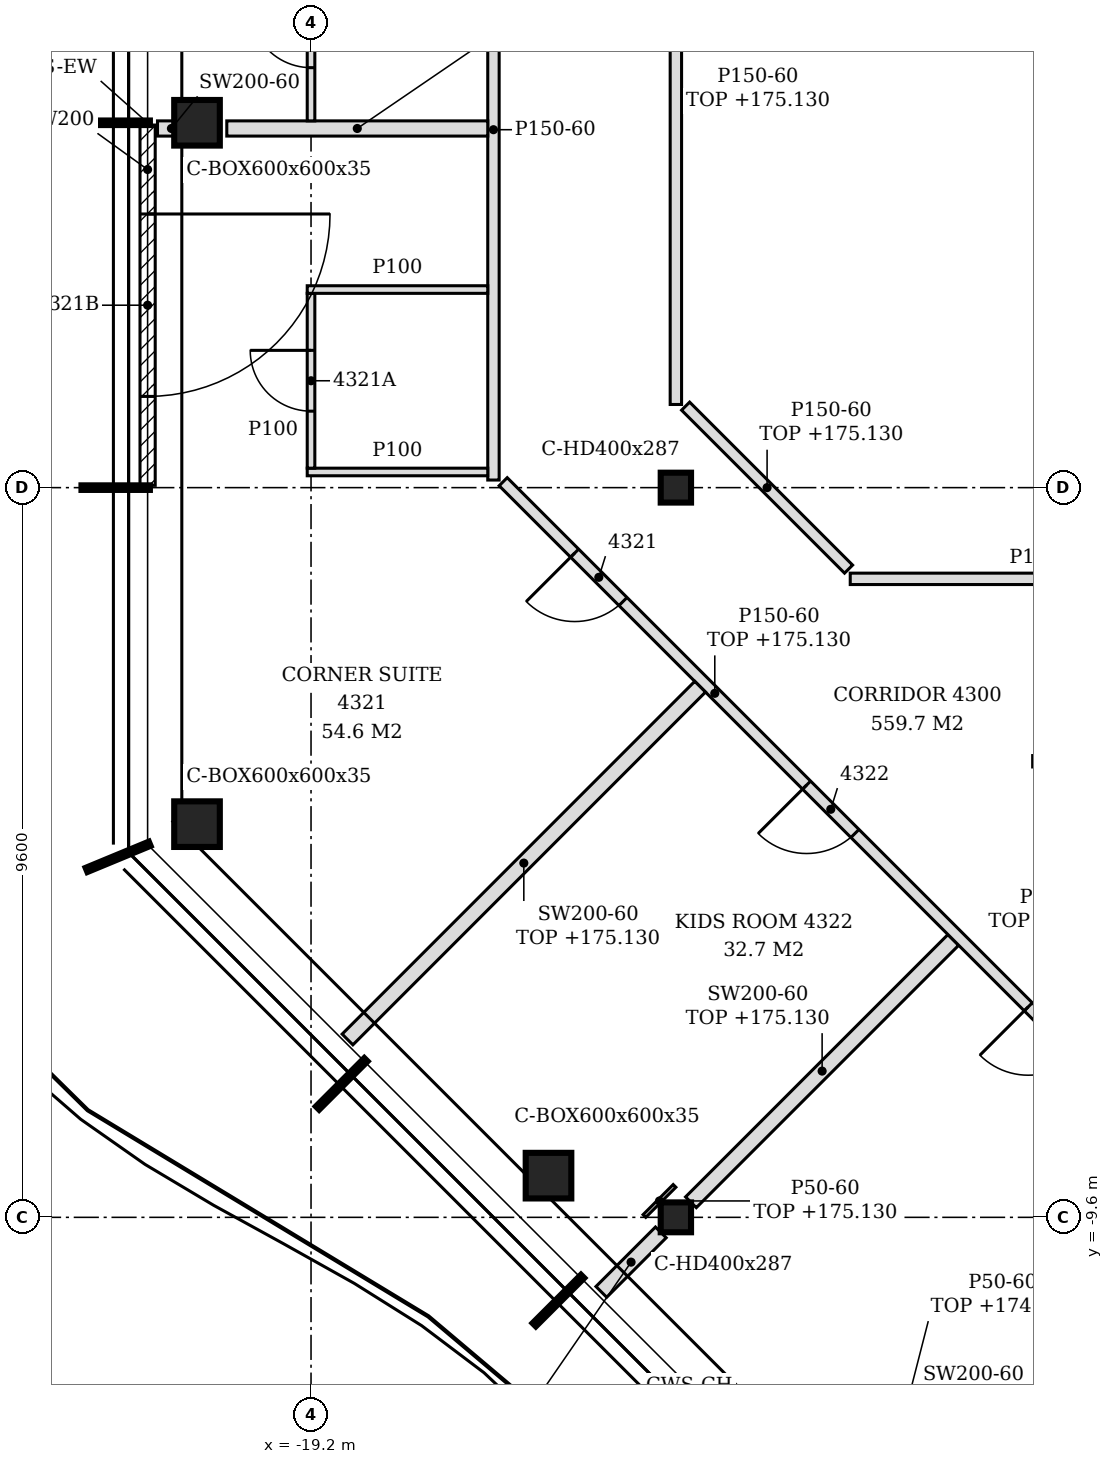
"""IFC4 building model, lengths in metres.
Left out: names, types, materials, properties, quantities, classifications, styles, units other than length and angle.
Written with IfcOpenShell. Run it as: python <this file> out.ifc"""

import sys

from ifc_helpers import new_model, si_unit, direction, frame, frame_2d, origin, origin_2d, place, context, subcontext, project, spatial, polyline, rectangle, hollow_rectangle, i_section, outline, extrude, clip, halfspace, element, fill, save


model = new_model("IFC4")
c1 = context("Model", 3, precision=1e-05, world=origin(), true_north=direction((0.0, 1.0)))
c2 = subcontext(c1, "Body", "Model", "MODEL_VIEW")
j1 = project(units=[si_unit("LENGTHUNIT", "METRE"), si_unit("PLANEANGLEUNIT", "RADIAN")], contexts=[c1])
p1 = place(None, origin())
s1 = spatial("IfcSite", under=j1, at=p1, CompositionType="ELEMENT")
p2 = place(p1, origin())
s2 = spatial("IfcBuilding", under=s1, at=p2, CompositionType="ELEMENT")
p3 = place(p2, frame((0.0, 0.0, 172.2)))
s3 = spatial("IfcBuildingStorey", under=s2, at=p3, CompositionType="ELEMENT", Elevation=172.2)
p4 = place(p3, frame((-20.7, 4.8, -0.15), z_axis=(0.062286415717, -0.041591906261, 0.997191313515), x_axis=(0.555325171193, 0.831633305153, 0.0)))
e1 = element("IfcColumn", 1, at=p4, inside=s3, PredefinedType="COLUMN", context=c2, shape_type="Clipping", body=[
    clip(clip(extrude(hollow_rectangle(XDim=0.6, YDim=0.6, WallThickness=0.035, at=origin_2d()), origin(), (0.0, 0.0, 1.0), 3.61), halfspace(frame((0.0, 0.0, 0.011), z_axis=(0.0, 0.0, 1.0), x_axis=(1.0, 0.0, 0.0)), True)), halfspace(frame((0.0, 0.0, 3.588), z_axis=(0.0, 0.0, 1.0), x_axis=(1.0, 0.0, 0.0)), False)),
])
p5 = place(p3, frame((-20.7, -4.427, -0.15), z_axis=(0.062286590776, -0.041524393851, 0.99719411617), x_axis=(0.554700196225, 0.832050294338, 0.0)))
e2 = element("IfcColumn", 2, at=p5, inside=s3, PredefinedType="COLUMN", context=c2, shape_type="Clipping", body=[
    clip(clip(extrude(hollow_rectangle(XDim=0.6, YDim=0.6, WallThickness=0.035, at=origin_2d()), origin(), (0.0, 0.0, 1.0), 3.61), halfspace(frame((0.0, 0.0, 0.011), z_axis=(0.0, 0.0, 1.0), x_axis=(1.0, 0.0, 0.0)), True)), halfspace(frame((0.0, 0.0, 3.588), z_axis=(0.0, 0.0, 1.0), x_axis=(1.0, 0.0, 0.0)), False)),
])
p6 = place(p3, frame((-16.076, -9.052, -0.15), z_axis=(0.06235395728, -0.04152421884, 0.997189913337), x_axis=(0.554283476609, 0.832327956732, 0.0)))
e3 = element("IfcColumn", 3, at=p6, inside=s3, PredefinedType="COLUMN", context=c2, shape_type="Clipping", body=[
    clip(clip(extrude(hollow_rectangle(XDim=0.6, YDim=0.6, WallThickness=0.035, at=origin_2d()), origin(), (0.0, 0.0, 1.0), 3.61), halfspace(frame((0.0, 0.0, 0.011), z_axis=(0.0, 0.0, 1.0), x_axis=(1.0, 0.0, 0.0)), True)), halfspace(frame((0.0, 0.0, 3.588), z_axis=(0.0, 0.0, 1.0), x_axis=(1.0, 0.0, 0.0)), False)),
])
for number, where, z_axis, x_axis in (
    (4, (-14.4, -9.6, -0.15), (0.0, 0.0, 1.0), (1.0, 0.0, 0.0)),
    (5, (-14.4, 0.0, -0.15), (0.0, 0.0, 1.0), (1.0, 0.0, 0.0)),
):
    element("IfcColumn", number, at=place(p3, frame(where, z_axis=z_axis, x_axis=x_axis)), inside=s3, PredefinedType="COLUMN", context=c2, shape_type="SweptSolid", body=[
        extrude(i_section(OverallWidth=0.399, OverallDepth=0.393, WebThickness=0.023, FlangeThickness=0.037, FilletRadius=0.015, at=origin_2d()), origin(), (0.0, 0.0, 1.0), 3.6),
    ])
p7 = place(p3, frame((-21.35, 4.77, 0.0), z_axis=(0.0, 0.0, 1.0), x_axis=(0.0, -1.0, 0.0)))
e6 = element("IfcWall", 6, at=p7, inside=s3, PredefinedType="NOTDEFINED", context=c2, shape_type="SweptSolid", body=[
    extrude(rectangle(XDim=4.74, YDim=0.2, at=frame_2d((2.37, 0.0))), origin(), (0.0, 0.0, 1.0), 3.45),
])
p8 = place(p7, frame((1.17, 0.0, 0.0)))
e7 = element("IfcOpeningElement", 7, at=p8, cuts=e6, PredefinedType="OPENING", context=c2, shape_type="SweptSolid", body=[
    extrude(rectangle(XDim=2.4, YDim=2.4, at=frame_2d((1.2, 1.2))), frame((0.0, 0.11, 0.0), z_axis=(0.0, -1.0, 0.0), x_axis=(1.0, 0.0, 0.0)), (0.0, 0.0, 1.0), 0.22),
])
p9 = place(p3, frame((-11.071, -13.482, 0.0), z_axis=(0.0, 0.0, 1.0), x_axis=(0.707034704659, 0.707178850368, 0.0)))
e8 = element("IfcWall", 8, at=p9, inside=s3, PredefinedType="PARTITIONING", context=c2, shape_type="SweptSolid", body=[
    extrude(rectangle(XDim=3.387, YDim=0.2, at=frame_2d((1.694, 0.0))), origin(), (0.0, 0.0, 1.0), 3.45),
])
p10 = place(p3, frame((-15.381, -10.581, 0.0), z_axis=(0.0, 0.0, 1.0), x_axis=(0.707217034054, 0.706996511125, 0.0)))
e9 = element("IfcWall", 9, at=p10, inside=s3, PredefinedType="PARTITIONING", context=c2, shape_type="SweptSolid", body=[
    extrude(rectangle(XDim=1.107, YDim=0.2, at=frame_2d((0.554, 0.0))), origin(), (0.0, 0.0, 1.0), 2.63),
])
p11 = place(p3, frame((-14.202, -9.402, 0.0), z_axis=(0.0, 0.0, 1.0), x_axis=(0.707081776084, 0.707131785404, 0.0)))
e10 = element("IfcWall", 10, at=p11, inside=s3, PredefinedType="PARTITIONING", context=c2, shape_type="SweptSolid", body=[
    extrude(rectangle(XDim=4.882, YDim=0.2, at=frame_2d((2.441, 0.0))), origin(), (0.0, 0.0, 1.0), 2.93),
])
p12 = place(p3, frame((-8.322, -8.272, 0.0), z_axis=(0.0, 0.0, 1.0), x_axis=(-0.707117118476, 0.707096443746, 0.0)))
e11 = element("IfcWall", 11, at=p12, inside=s3, PredefinedType="PARTITIONING", context=c2, shape_type="SweptSolid", body=[
    extrude(rectangle(XDim=11.809, YDim=0.15, at=frame_2d((5.904, 0.0))), origin(), (0.0, 0.0, 1.0), 2.93),
])
p13 = place(p12, frame((9.579, 0.0, 0.0)))
e12 = element("IfcOpeningElement", 12, at=p13, cuts=e11, PredefinedType="OPENING", context=c2, shape_type="SweptSolid", body=[
    extrude(rectangle(XDim=0.9, YDim=2.1, at=frame_2d((0.45, 1.05))), frame((0.0, 0.085, 0.0), z_axis=(0.0, -1.0, 0.0), x_axis=(1.0, 0.0, 0.0)), (0.0, 0.0, 1.0), 0.17),
])
p14 = place(p12, frame((5.264, 0.0, 0.0)))
e13 = element("IfcOpeningElement", 13, at=p14, cuts=e11, PredefinedType="OPENING", context=c2, shape_type="SweptSolid", body=[
    extrude(rectangle(XDim=0.9, YDim=2.1, at=frame_2d((0.45, 1.05))), frame((0.0, 0.085, 0.0), z_axis=(0.0, -1.0, 0.0), x_axis=(1.0, 0.0, 0.0)), (0.0, 0.0, 1.0), 0.17),
])
p15 = place(p12, frame((1.139, 0.0, 0.0)))
e14 = element("IfcOpeningElement", 14, at=p15, cuts=e11, PredefinedType="OPENING", context=c2, shape_type="SweptSolid", body=[
    extrude(rectangle(XDim=0.9, YDim=2.1, at=frame_2d((0.45, 1.05))), frame((0.0, 0.085, 0.0), z_axis=(0.0, -1.0, 0.0), x_axis=(1.0, 0.0, 0.0)), (0.0, 0.0, 1.0), 0.17),
])
p16 = place(p3, frame((-18.72, -7.26, 0.0), z_axis=(0.0, 0.0, 1.0), x_axis=(0.706939337177, 0.707274185555, 0.0)))
e15 = element("IfcWall", 15, at=p16, inside=s3, PredefinedType="PARTITIONING", context=c2, shape_type="SweptSolid", body=[
    extrude(rectangle(XDim=6.562, YDim=0.2, at=frame_2d((3.281, 0.0))), origin(), (0.0, 0.0, 1.0), 2.93),
])
p17 = place(p3, frame((-9.706, -3.6, 0.0), z_axis=(0.0, 0.0, 1.0), x_axis=(1.0, 0.0, 0.0)))
e16 = element("IfcWall", 16, at=p17, inside=s3, PredefinedType="PARTITIONING", context=c2, shape_type="SweptSolid", body=[
    extrude(outline(polyline([(0.0, 0.0), (4.981, 0.0), (4.981, 2.83), (4.756, 2.83), (4.754, 3.45), (0.0, 3.45), (0.0, 0.0)])), frame((0.0, 0.075, 0.0), z_axis=(0.0, -1.0, 0.0), x_axis=(1.0, 0.0, 0.0)), (0.0, 0.0, 1.0), 0.15),
])
p18 = place(p3, frame((-12.106, -1.2, 0.0), z_axis=(0.0, 0.0, 1.0), x_axis=(1.0, 0.0, 0.0)))
e17 = element("IfcWall", 17, at=p18, inside=s3, PredefinedType="PARTITIONING", context=c2, shape_type="SweptSolid", body=[
    extrude(outline(polyline([(0.0, 0.0), (7.381, 0.0), (7.381, 2.83), (7.156, 2.83), (7.154, 3.45), (0.0, 3.45), (0.0, 0.0)])), frame((0.0, 0.075, 0.0), z_axis=(0.0, -1.0, 0.0), x_axis=(1.0, 0.0, 0.0)), (0.0, 0.0, 1.0), 0.15),
])
p19 = place(p18, frame((5.256, 0.0, 0.0)))
e18 = element("IfcOpeningElement", 18, at=p19, cuts=e17, PredefinedType="OPENING", context=c2, shape_type="SweptSolid", body=[
    extrude(rectangle(XDim=0.8, YDim=2.1, at=frame_2d((0.4, 1.05))), frame((0.0, 0.085, 0.0), z_axis=(0.0, -1.0, 0.0), x_axis=(1.0, 0.0, 0.0)), (0.0, 0.0, 1.0), 0.17),
])
p20 = place(p3, frame((-12.128, -1.072, 0.0), z_axis=(0.0, 0.0, 1.0), x_axis=(-0.707106781187, 0.707106781187, 0.0)))
e19 = element("IfcWall", 19, at=p20, inside=s3, PredefinedType="PARTITIONING", context=c2, shape_type="SweptSolid", body=[
    extrude(rectangle(XDim=3.032, YDim=0.15, at=frame_2d((1.516, 0.0))), origin(), (0.0, 0.0, 1.0), 2.93),
])
p21 = place(p3, frame((-16.8, 0.1, 0.0), z_axis=(0.0, 0.0, 1.0), x_axis=(0.0, 1.0, 0.0)))
e20 = element("IfcWall", 20, at=p21, inside=s3, PredefinedType="PARTITIONING", context=c2, shape_type="SweptSolid", body=[
    extrude(outline(polyline([(0.0, 0.0), (12.131, 0.0), (12.131, 3.45), (9.445, 3.45), (9.443, 2.98), (9.255, 2.98), (9.253, 3.45), (4.645, 3.45), (4.643, 2.98), (4.455, 2.98), (4.453, 3.45), (0.0, 3.45), (0.0, 0.0)])), frame((0.0, 0.075, 0.0), z_axis=(0.0, -1.0, 0.0), x_axis=(1.0, 0.0, 0.0)), (0.0, 0.0, 1.0), 0.15),
])
p22 = place(p21, frame((9.218, 0.0, 0.0)))
e21 = element("IfcOpeningElement", 21, at=p22, cuts=e20, PredefinedType="OPENING", context=c2, shape_type="SweptSolid", body=[
    extrude(rectangle(XDim=0.9, YDim=2.1, at=frame_2d((0.45, 1.05))), frame((0.0, 0.085, 0.0), z_axis=(0.0, -1.0, 0.0), x_axis=(1.0, 0.0, 0.0)), (0.0, 0.0, 1.0), 0.17),
])
p23 = place(p3, frame((-19.25, 0.206, 0.0), z_axis=(0.0, 0.0, 1.0), x_axis=(1.0, 0.0, 0.0)))
e22 = element("IfcWall", 22, at=p23, inside=s3, PredefinedType="PARTITIONING", context=c2, shape_type="SweptSolid", body=[
    extrude(rectangle(XDim=2.375, YDim=0.1, at=frame_2d((1.188, 0.0))), origin(), (0.0, 0.0, 1.0), 3.45),
])
p24 = place(p3, frame((-19.2, 0.256, 0.0), z_axis=(0.0, 0.0, 1.0), x_axis=(0.0, 1.0, 0.0)))
e23 = element("IfcWall", 23, at=p24, inside=s3, PredefinedType="PARTITIONING", context=c2, shape_type="SweptSolid", body=[
    extrude(rectangle(XDim=2.3, YDim=0.1, at=frame_2d((1.15, 0.0))), origin(), (0.0, 0.0, 1.0), 3.45),
])
p25 = place(p24, frame((0.75, 0.0, 0.0)))
e24 = element("IfcOpeningElement", 24, at=p25, cuts=e23, PredefinedType="OPENING", context=c2, shape_type="SweptSolid", body=[
    extrude(rectangle(XDim=0.8, YDim=2.1, at=frame_2d((0.4, 1.05))), frame((0.0, 0.06, 0.0), z_axis=(0.0, -1.0, 0.0), x_axis=(1.0, 0.0, 0.0)), (0.0, 0.0, 1.0), 0.12),
])
p26 = place(p3, frame((-14.4, 1.094, 0.0), z_axis=(0.0, 0.0, 1.0), x_axis=(0.0, 1.0, 0.0)))
e25 = element("IfcWall", 25, at=p26, inside=s3, PredefinedType="PARTITIONING", context=c2, shape_type="SweptSolid", body=[
    extrude(rectangle(XDim=8.31, YDim=0.15, at=frame_2d((4.155, 0.0))), origin(), (0.0, 0.0, 1.0), 2.93),
])
p27 = place(p3, frame((-19.25, 2.606, 0.0), z_axis=(0.0, 0.0, 1.0), x_axis=(1.0, 0.0, 0.0)))
e26 = element("IfcWall", 26, at=p27, inside=s3, PredefinedType="PARTITIONING", context=c2, shape_type="SweptSolid", body=[
    extrude(rectangle(XDim=2.375, YDim=0.1, at=frame_2d((1.188, 0.0))), origin(), (0.0, 0.0, 1.0), 3.45),
])
p28 = place(p3, frame((-21.22, 4.725, 0.0), z_axis=(0.0, 0.0, 1.0), x_axis=(1.0, 0.0, 0.0)))
e27 = element("IfcWall", 27, at=p28, inside=s3, PredefinedType="PARTITIONING", context=c2, shape_type="SweptSolid", body=[
    extrude(outline(polyline([(0.0, 0.0), (0.113, 0.0), (0.167, 0.863), (0.22, 1.725), (0.289, 2.588), (0.367, 3.45), (0.0, 3.45), (0.0, 2.588), (0.0, 1.725), (0.0, 0.863), (0.0, 0.0)])), frame((0.0, 0.1, 0.0), z_axis=(0.0, -1.0, 0.0), x_axis=(1.0, 0.0, 0.0)), (0.0, 0.0, 1.0), 0.2),
])
p29 = place(p3, frame((-20.308, 4.725, 0.0), z_axis=(0.0, 0.0, 1.0), x_axis=(1.0, 0.0, 0.0)))
e28 = element("IfcWall", 28, at=p29, inside=s3, PredefinedType="PARTITIONING", context=c2, shape_type="SweptSolid", body=[
    extrude(outline(polyline([(0.0, 0.0), (3.433, 0.0), (3.433, 0.863), (3.433, 1.725), (3.433, 2.588), (3.433, 2.98), (0.221, 2.98), (0.196, 2.588), (0.142, 1.725), (0.078, 0.863), (0.0, 0.0)])), frame((0.0, 0.1, 0.0), z_axis=(0.0, -1.0, 0.0), x_axis=(1.0, 0.0, 0.0)), (0.0, 0.0, 1.0), 0.2),
])
p30 = place(p3, frame((-19.2, 4.825, 0.0), z_axis=(0.0, 0.0, 1.0), x_axis=(0.0, 1.0, 0.0)))
e29 = element("IfcWall", 29, at=p30, inside=s3, PredefinedType="PARTITIONING", context=c2, shape_type="SweptSolid", body=[
    extrude(rectangle(XDim=2.25, YDim=0.1, at=frame_2d((1.125, 0.0))), origin(), (0.0, 0.0, 1.0), 3.45),
])
p31 = place(p30, frame((0.7, 0.0, 0.0)))
e30 = element("IfcOpeningElement", 30, at=p31, cuts=e29, PredefinedType="OPENING", context=c2, shape_type="SweptSolid", body=[
    extrude(rectangle(XDim=0.8, YDim=2.1, at=frame_2d((0.4, 1.05))), frame((0.0, 0.06, 0.0), z_axis=(0.0, -1.0, 0.0), x_axis=(1.0, 0.0, 0.0)), (0.0, 0.0, 1.0), 0.12),
])
p32 = place(p3, frame((-14.814, -9.582, 0.0), z_axis=(0.0, 0.0, 1.0), x_axis=(0.707106781187, 0.707106781187, 0.0)))
e31 = element("IfcWall", 31, at=p32, inside=s3, PredefinedType="PARTITIONING", context=c2, shape_type="SweptSolid", body=[
    extrude(rectangle(XDim=0.56, YDim=0.05, at=frame_2d((0.28, 0.0))), origin(), (0.0, 0.0, 1.0), 2.93),
])
p33 = place(p8, origin())
e32 = element("IfcDoor", 32, at=p33, inside=s3, OperationType="SINGLE_SWING_LEFT", PredefinedType="DOOR", context=c2, shape_type="SweptSolid", body=[
    extrude(rectangle(XDim=2.4, YDim=2.4, at=frame_2d((1.2, 1.2))), frame((0.0, 0.025, 0.0), z_axis=(0.0, -1.0, 0.0), x_axis=(1.0, 0.0, 0.0)), (0.0, 0.0, 1.0), 0.05),
])
fill(e7, e32)
p34 = place(p31, origin())
e33 = element("IfcDoor", 33, at=p34, inside=s3, OperationType="SINGLE_SWING_RIGHT", PredefinedType="DOOR", context=c2, shape_type="SweptSolid", body=[
    extrude(rectangle(XDim=0.8, YDim=2.1, at=frame_2d((0.4, 1.05))), frame((0.0, 0.025, 0.0), z_axis=(0.0, -1.0, 0.0), x_axis=(1.0, 0.0, 0.0)), (0.0, 0.0, 1.0), 0.05),
])
fill(e30, e33)
p35 = place(p13, origin())
e34 = element("IfcDoor", 34, at=p35, inside=s3, OperationType="SINGLE_SWING_RIGHT", PredefinedType="DOOR", context=c2, shape_type="SweptSolid", body=[
    extrude(rectangle(XDim=0.9, YDim=2.1, at=frame_2d((0.45, 1.05))), frame((0.0, 0.025, 0.0), z_axis=(0.0, -1.0, 0.0), x_axis=(1.0, 0.0, 0.0)), (0.0, 0.0, 1.0), 0.05),
])
fill(e12, e34)
p36 = place(p25, origin())
e35 = element("IfcDoor", 35, at=p36, inside=s3, OperationType="SINGLE_SWING_RIGHT", PredefinedType="DOOR", context=c2, shape_type="SweptSolid", body=[
    extrude(rectangle(XDim=0.8, YDim=2.1, at=frame_2d((0.4, 1.05))), frame((0.0, 0.025, 0.0), z_axis=(0.0, -1.0, 0.0), x_axis=(1.0, 0.0, 0.0)), (0.0, 0.0, 1.0), 0.05),
])
fill(e24, e35)
p37 = place(p14, origin())
e36 = element("IfcDoor", 36, at=p37, inside=s3, OperationType="SINGLE_SWING_RIGHT", PredefinedType="DOOR", context=c2, shape_type="SweptSolid", body=[
    extrude(rectangle(XDim=0.9, YDim=2.1, at=frame_2d((0.45, 1.05))), frame((0.0, 0.025, 0.0), z_axis=(0.0, -1.0, 0.0), x_axis=(1.0, 0.0, 0.0)), (0.0, 0.0, 1.0), 0.05),
])
fill(e13, e36)
p38 = place(p15, origin())
e37 = element("IfcDoor", 37, at=p38, inside=s3, OperationType="SINGLE_SWING_RIGHT", PredefinedType="DOOR", context=c2, shape_type="SweptSolid", body=[
    extrude(rectangle(XDim=0.9, YDim=2.1, at=frame_2d((0.45, 1.05))), frame((0.0, 0.025, 0.0), z_axis=(0.0, -1.0, 0.0), x_axis=(1.0, 0.0, 0.0)), (0.0, 0.0, 1.0), 0.05),
])
fill(e14, e37)
save(model, sys.argv[1])
